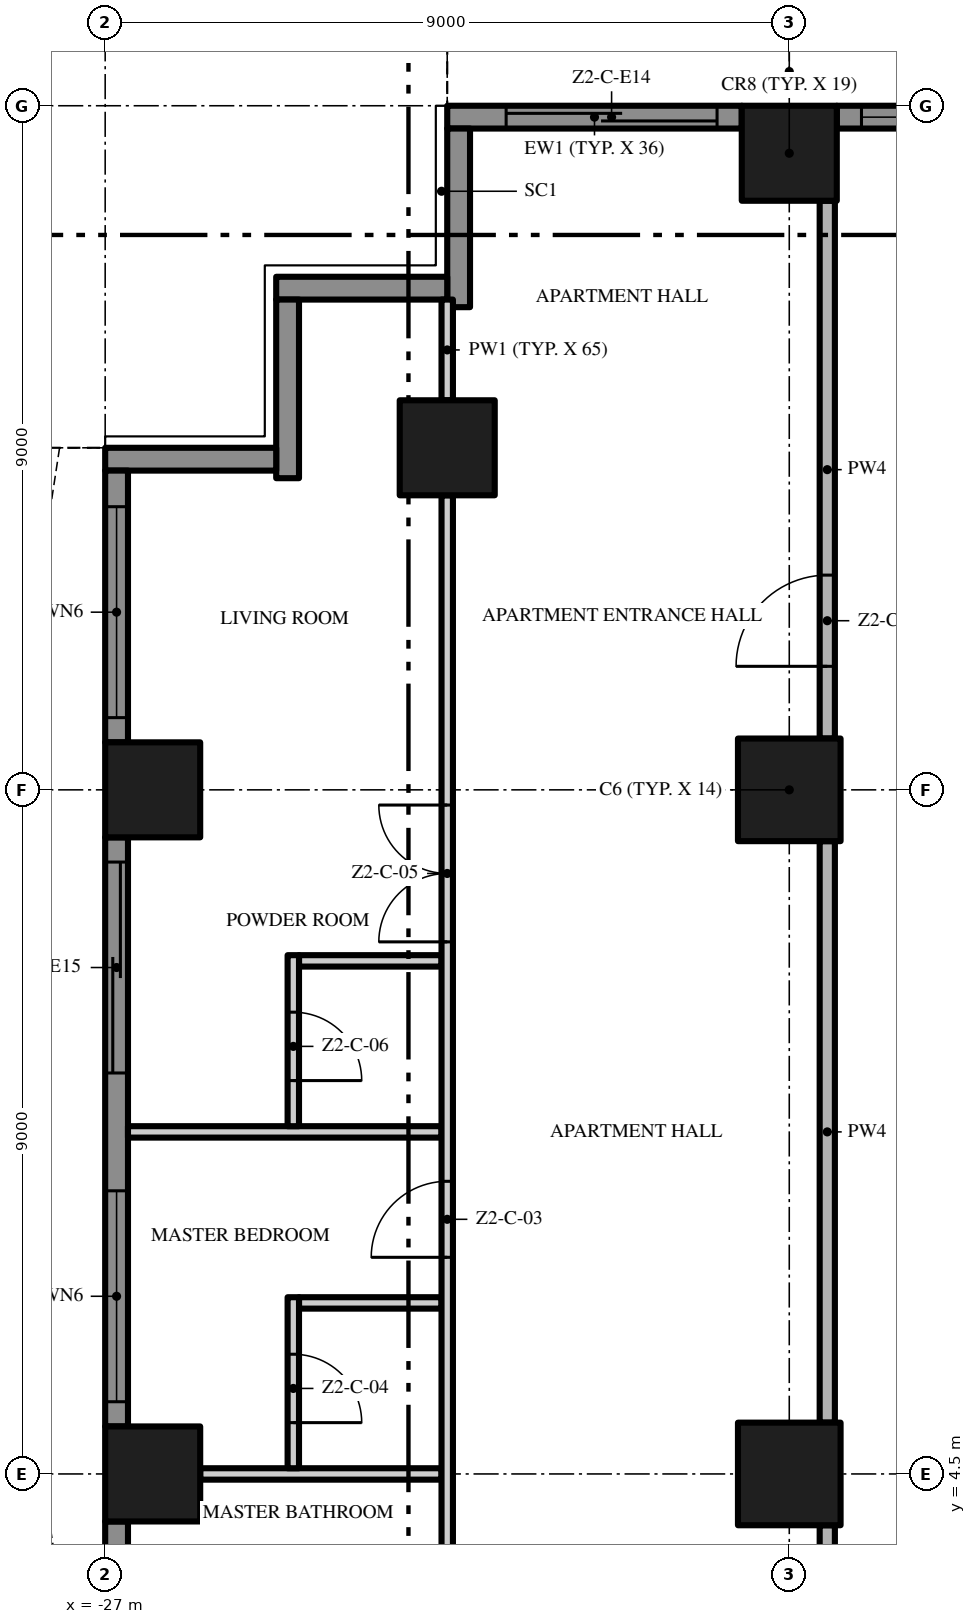
"""IFC4 building model, lengths in metres.
Left out: names, types, materials, properties, quantities, classifications, styles, units other than length and angle.
Written with IfcOpenShell. Run it as: python <this file> out.ifc"""

import sys

from ifc_helpers import new_model, si_unit, direction, frame, frame_2d, origin, origin_2d, place, context, subcontext, project, spatial, polyline, rectangle, outline, extrude, element, fill, save


model = new_model("IFC4")
c1 = context("Model", 3, precision=1e-05, world=origin(), true_north=direction((0.0, 1.0)))
c2 = subcontext(c1, "Body", "Model", "MODEL_VIEW")
j1 = project(units=[si_unit("LENGTHUNIT", "METRE"), si_unit("PLANEANGLEUNIT", "RADIAN")], contexts=[c1])
p1 = place(None, origin())
s1 = spatial("IfcSite", under=j1, at=p1, CompositionType="ELEMENT")
p2 = place(p1, origin())
s2 = spatial("IfcBuilding", under=s1, at=p2, CompositionType="ELEMENT")
p3 = place(p2, frame((0.0, 0.0, 99.8)))
s3 = spatial("IfcBuildingStorey", under=s2, at=p3, CompositionType="ELEMENT", Elevation=99.8)
p4 = place(p3, frame((-18.0, 13.5, 0.0), z_axis=(0.0, 0.0, 1.0), x_axis=(1.0, 0.0, 0.0)))
e1 = element("IfcColumn", 1, at=p4, inside=s3, PredefinedType="COLUMN", context=c2, shape_type="SweptSolid", body=[
    extrude(rectangle(XDim=1.35, YDim=1.35, at=origin_2d()), origin(), (0.0, 0.0, 1.0), 3.5),
])
p5 = place(p3, frame((-18.0, 21.875, 0.0), z_axis=(0.0, 0.0, 1.0), x_axis=(1.0, 0.0, 0.0)))
e2 = element("IfcColumn", 2, at=p5, inside=s3, PredefinedType="COLUMN", context=c2, shape_type="SweptSolid", body=[
    extrude(rectangle(XDim=1.25, YDim=1.25, at=origin_2d()), origin(), (0.0, 0.0, 1.0), 3.5),
])
p6 = place(p3, frame((-18.0, 4.5, 0.0), z_axis=(0.0, 0.0, 1.0), x_axis=(1.0, 0.0, 0.0)))
e3 = element("IfcColumn", 3, at=p6, inside=s3, PredefinedType="COLUMN", context=c2, shape_type="SweptSolid", body=[
    extrude(rectangle(XDim=1.35, YDim=1.35, at=origin_2d()), origin(), (0.0, 0.0, 1.0), 3.5),
])
for number, where, z_axis, x_axis in (
    (4, (-26.375, 13.5, 0.0), (0.0, 0.0, 1.0), (1.0, 0.0, 0.0)),
    (5, (-22.5, 18.0, 0.0), (0.0, 0.0, 1.0), (1.0, 0.0, 0.0)),
    (6, (-26.375, 4.5, 0.0), (0.0, 0.0, 1.0), (1.0, 0.0, 0.0)),
):
    element("IfcColumn", number, at=place(p3, frame(where, z_axis=z_axis, x_axis=x_axis)), inside=s3, PredefinedType="COLUMN", context=c2, shape_type="SweptSolid", body=[
        extrude(rectangle(XDim=1.25, YDim=1.25, at=origin_2d()), origin(), (0.0, 0.0, 1.0), 3.5),
    ])
p7 = place(p3, frame((-17.375, 22.35, 0.0), z_axis=(0.0, 0.0, 1.0), x_axis=(1.0, 0.0, 0.0)))
e7 = element("IfcWall", 7, at=p7, inside=s3, PredefinedType="SOLIDWALL", context=c2, shape_type="SweptSolid", body=[
    extrude(rectangle(XDim=3.875, YDim=0.3, at=frame_2d((1.938, 0.0))), origin(), (0.0, 0.0, 1.0), 3.5),
])
p8 = place(p7, frame((0.325, 0.0, 0.45)))
e8 = element("IfcOpeningElement", 8, at=p8, cuts=e7, PredefinedType="OPENING", context=c2, shape_type="SweptSolid", body=[
    extrude(rectangle(XDim=2.775, YDim=2.65, at=frame_2d((1.387, 1.325))), frame((0.0, 0.16, 0.0), z_axis=(0.0, -1.0, 0.0), x_axis=(1.0, 0.0, 0.0)), (0.0, 0.0, 1.0), 0.32),
])
p9 = place(p3, frame((-22.5, 22.35, 0.0), z_axis=(0.0, 0.0, 1.0), x_axis=(1.0, 0.0, 0.0)))
e9 = element("IfcWall", 9, at=p9, inside=s3, PredefinedType="SOLIDWALL", context=c2, shape_type="SweptSolid", body=[
    extrude(rectangle(XDim=3.875, YDim=0.3, at=frame_2d((1.938, 0.0))), origin(), (0.0, 0.0, 1.0), 3.5),
])
p10 = place(p9, frame((0.775, 0.0, 0.0)))
e10 = element("IfcOpeningElement", 10, at=p10, cuts=e9, PredefinedType="OPENING", context=c2, shape_type="SweptSolid", body=[
    extrude(rectangle(XDim=2.775, YDim=2.4, at=frame_2d((1.387, 1.2))), frame((0.0, 0.16, 0.0), z_axis=(0.0, -1.0, 0.0), x_axis=(1.0, 0.0, 0.0)), (0.0, 0.0, 1.0), 0.32),
])
p11 = place(p3, frame((-22.35, 19.85, 0.0), z_axis=(0.0, 0.0, 1.0), x_axis=(0.0, 1.0, 0.0)))
e11 = element("IfcWall", 11, at=p11, inside=s3, PredefinedType="SOLIDWALL", context=c2, shape_type="SweptSolid", body=[
    extrude(rectangle(XDim=2.35, YDim=0.3, at=frame_2d((1.175, 0.0))), origin(), (0.0, 0.0, 1.0), 3.5),
])
p12 = place(p3, frame((-24.75, 20.1, 0.0), z_axis=(0.0, 0.0, 1.0), x_axis=(1.0, 0.0, 0.0)))
e12 = element("IfcWall", 12, at=p12, inside=s3, PredefinedType="SOLIDWALL", context=c2, shape_type="SweptSolid", body=[
    extrude(rectangle(XDim=2.25, YDim=0.3, at=frame_2d((1.125, 0.0))), origin(), (0.0, 0.0, 1.0), 3.5),
])
p13 = place(p3, frame((-24.6, 17.6, 0.0), z_axis=(0.0, 0.0, 1.0), x_axis=(0.0, 1.0, 0.0)))
e13 = element("IfcWall", 13, at=p13, inside=s3, PredefinedType="SOLIDWALL", context=c2, shape_type="SweptSolid", body=[
    extrude(rectangle(XDim=2.35, YDim=0.3, at=frame_2d((1.175, 0.0))), origin(), (0.0, 0.0, 1.0), 3.5),
])
p14 = place(p3, frame((-27.0, 17.85, 0.0), z_axis=(0.0, 0.0, 1.0), x_axis=(1.0, 0.0, 0.0)))
e14 = element("IfcWall", 14, at=p14, inside=s3, PredefinedType="SOLIDWALL", context=c2, shape_type="SweptSolid", body=[
    extrude(rectangle(XDim=2.25, YDim=0.3, at=frame_2d((1.125, 0.0))), origin(), (0.0, 0.0, 1.0), 3.5),
])
p15 = place(p3, frame((-26.85, 14.125, 0.0), z_axis=(0.0, 0.0, 1.0), x_axis=(0.0, 1.0, 0.0)))
e15 = element("IfcWall", 15, at=p15, inside=s3, PredefinedType="SOLIDWALL", context=c2, shape_type="SweptSolid", body=[
    extrude(rectangle(XDim=3.575, YDim=0.3, at=frame_2d((1.788, 0.0))), origin(), (0.0, 0.0, 1.0), 3.5),
])
p16 = place(p15, frame((0.325, 0.0, 0.45)))
e16 = element("IfcOpeningElement", 16, at=p16, cuts=e15, PredefinedType="OPENING", context=c2, shape_type="SweptSolid", body=[
    extrude(rectangle(XDim=2.775, YDim=2.65, at=frame_2d((1.387, 1.325))), frame((0.0, 0.16, 0.0), z_axis=(0.0, -1.0, 0.0), x_axis=(1.0, 0.0, 0.0)), (0.0, 0.0, 1.0), 0.32),
])
p17 = place(p3, frame((-26.85, 5.125, 0.0), z_axis=(0.0, 0.0, 1.0), x_axis=(0.0, 1.0, 0.0)))
e17 = element("IfcWall", 17, at=p17, inside=s3, PredefinedType="SOLIDWALL", context=c2, shape_type="SweptSolid", body=[
    extrude(rectangle(XDim=7.75, YDim=0.3, at=frame_2d((3.875, 0.0))), origin(), (0.0, 0.0, 1.0), 3.5),
])
p18 = place(p17, frame((4.65, 0.0, 0.0)))
e18 = element("IfcOpeningElement", 18, at=p18, cuts=e17, PredefinedType="OPENING", context=c2, shape_type="SweptSolid", body=[
    extrude(rectangle(XDim=2.775, YDim=2.4, at=frame_2d((1.387, 1.2))), frame((0.0, 0.16, 0.0), z_axis=(0.0, -1.0, 0.0), x_axis=(1.0, 0.0, 0.0)), (0.0, 0.0, 1.0), 0.32),
])
p19 = place(p17, frame((0.325, 0.0, 0.45)))
e19 = element("IfcOpeningElement", 19, at=p19, cuts=e17, PredefinedType="OPENING", context=c2, shape_type="SweptSolid", body=[
    extrude(rectangle(XDim=2.775, YDim=2.65, at=frame_2d((1.387, 1.325))), frame((0.0, 0.16, 0.0), z_axis=(0.0, -1.0, 0.0), x_axis=(1.0, 0.0, 0.0)), (0.0, 0.0, 1.0), 0.32),
])
p20 = place(p3, frame((-26.85, -3.875, 0.0), z_axis=(0.0, 0.0, 1.0), x_axis=(0.0, 1.0, 0.0)))
e20 = element("IfcWall", 20, at=p20, inside=s3, PredefinedType="SOLIDWALL", context=c2, shape_type="SweptSolid", body=[
    extrude(rectangle(XDim=7.75, YDim=0.3, at=frame_2d((3.875, 0.0))), origin(), (0.0, 0.0, 1.0), 3.5),
])
p21 = place(p20, frame((4.65, 0.0, 0.45)))
e21 = element("IfcOpeningElement", 21, at=p21, cuts=e20, PredefinedType="OPENING", context=c2, shape_type="SweptSolid", body=[
    extrude(rectangle(XDim=2.775, YDim=2.65, at=frame_2d((1.387, 1.325))), frame((0.0, 0.16, 0.0), z_axis=(0.0, -1.0, 0.0), x_axis=(1.0, 0.0, 0.0)), (0.0, 0.0, 1.0), 0.32),
])
p22 = place(p20, frame((0.325, 0.0, 0.0)))
e22 = element("IfcOpeningElement", 22, at=p22, cuts=e20, PredefinedType="OPENING", context=c2, shape_type="SweptSolid", body=[
    extrude(rectangle(XDim=2.775, YDim=2.4, at=frame_2d((1.387, 1.2))), frame((0.0, 0.16, 0.0), z_axis=(0.0, -1.0, 0.0), x_axis=(1.0, 0.0, 0.0)), (0.0, 0.0, 1.0), 0.32),
])
p23 = place(p3, origin())
e23 = element("IfcWall", 23, at=p23, inside=s3, PredefinedType="USERDEFINED", context=c2, shape_type="SweptSolid", body=[
    extrude(outline(polyline([(-13.5, 23.1), (-15.0, 23.329), (-16.5, 23.929), (-18.0, 24.671), (-19.5, 25.271), (-21.0, 25.5), (-22.5, 25.271), (-22.462, 25.024), (-21.0, 25.247), (-19.566, 25.028), (-18.102, 24.442), (-16.602, 23.701), (-15.066, 23.086), (-13.538, 22.853), (-13.5, 23.1)])), origin(), (0.0, 0.0, 1.0), 0.9),
])
p24 = place(p3, origin())
e24 = element("IfcWall", 24, at=p24, inside=s3, PredefinedType="USERDEFINED", context=c2, shape_type="SweptSolid", body=[
    extrude(outline(polyline([(-27.6, 18.0), (-27.829, 16.5), (-28.429, 15.0), (-29.171, 13.5), (-29.771, 12.0), (-30.0, 10.5), (-29.771, 9.0), (-29.171, 7.5), (-28.429, 6.0), (-27.829, 4.5), (-27.6, 3.0), (-27.829, 1.5), (-28.429, 0.0), (-29.171, -1.5), (-29.771, -3.0), (-30.0, -4.5), (-29.771, -6.0), (-29.171, -7.5), (-28.429, -9.0), (-27.829, -10.5), (-27.6, -12.0), (-27.829, -13.5), (-28.429, -15.0), (-29.171, -16.5), (-29.771, -18.0), (-29.539, -18.093), (-28.942, -16.602), (-28.201, -15.102), (-27.586, -13.566), (-27.347, -12.0), (-27.586, -10.434), (-28.201, -8.898), (-28.942, -7.398), (-29.528, -5.934), (-29.747, -4.5), (-29.528, -3.066), (-28.942, -1.602), (-28.201, -0.102), (-27.586, 1.434), (-27.347, 3.0), (-27.586, 4.566), (-28.201, 6.102), (-28.942, 7.602), (-29.528, 9.066), (-29.747, 10.5), (-29.528, 11.934), (-28.942, 13.398), (-28.201, 14.898), (-27.586, 16.434), (-27.353, 17.962), (-27.6, 18.0)])), origin(), (0.0, 0.0, 1.0), 0.9),
])
p25 = place(p3, frame((-25.75, 4.5, 0.0), z_axis=(0.0, 0.0, 1.0), x_axis=(1.0, 0.0, 0.0)))
e25 = element("IfcWall", 25, at=p25, inside=s3, PredefinedType="PARTITIONING", context=c2, shape_type="SweptSolid", body=[
    extrude(rectangle(XDim=3.175, YDim=0.15, at=frame_2d((1.587, 0.0))), origin(), (0.0, 0.0, 1.0), 3.5),
])
p26 = place(p3, frame((-24.45, 6.75, 0.0), z_axis=(0.0, 0.0, 1.0), x_axis=(1.0, 0.0, 0.0)))
e26 = element("IfcWall", 26, at=p26, inside=s3, PredefinedType="PARTITIONING", context=c2, shape_type="SweptSolid", body=[
    extrude(rectangle(XDim=1.875, YDim=0.15, at=frame_2d((0.938, 0.0))), origin(), (0.0, 0.0, 1.0), 3.5),
])
p27 = place(p3, frame((-26.7, 9.0, 0.0), z_axis=(0.0, 0.0, 1.0), x_axis=(1.0, 0.0, 0.0)))
e27 = element("IfcWall", 27, at=p27, inside=s3, PredefinedType="PARTITIONING", context=c2, shape_type="SweptSolid", body=[
    extrude(rectangle(XDim=4.125, YDim=0.15, at=frame_2d((2.062, 0.0))), origin(), (0.0, 0.0, 1.0), 3.5),
])
p28 = place(p3, frame((-24.45, 11.25, 0.0), z_axis=(0.0, 0.0, 1.0), x_axis=(1.0, 0.0, 0.0)))
e28 = element("IfcWall", 28, at=p28, inside=s3, PredefinedType="PARTITIONING", context=c2, shape_type="SweptSolid", body=[
    extrude(rectangle(XDim=1.875, YDim=0.15, at=frame_2d((0.938, 0.0))), origin(), (0.0, 0.0, 1.0), 3.5),
])
p29 = place(p3, frame((-24.525, 6.825, 0.0), z_axis=(0.0, 0.0, 1.0), x_axis=(0.0, -1.0, 0.0)))
e29 = element("IfcWall", 29, at=p29, inside=s3, PredefinedType="PARTITIONING", context=c2, shape_type="SweptSolid", body=[
    extrude(rectangle(XDim=2.25, YDim=0.15, at=frame_2d((1.125, 0.0))), origin(), (0.0, 0.0, 1.0), 3.5),
])
p30 = place(p29, frame((0.75, 0.0, 0.0)))
e30 = element("IfcOpeningElement", 30, at=p30, cuts=e29, PredefinedType="OPENING", context=c2, shape_type="SweptSolid", body=[
    extrude(rectangle(XDim=0.9, YDim=2.1, at=frame_2d((0.45, 1.05))), frame((0.0, 0.085, 0.0), z_axis=(0.0, -1.0, 0.0), x_axis=(1.0, 0.0, 0.0)), (0.0, 0.0, 1.0), 0.17),
])
p31 = place(p3, frame((-24.525, 11.325, 0.0), z_axis=(0.0, 0.0, 1.0), x_axis=(0.0, -1.0, 0.0)))
e31 = element("IfcWall", 31, at=p31, inside=s3, PredefinedType="PARTITIONING", context=c2, shape_type="SweptSolid", body=[
    extrude(rectangle(XDim=2.25, YDim=0.15, at=frame_2d((1.125, 0.0))), origin(), (0.0, 0.0, 1.0), 3.5),
])
p32 = place(p31, frame((0.75, 0.0, 0.0)))
e32 = element("IfcOpeningElement", 32, at=p32, cuts=e31, PredefinedType="OPENING", context=c2, shape_type="SweptSolid", body=[
    extrude(rectangle(XDim=0.9, YDim=2.1, at=frame_2d((0.45, 1.05))), frame((0.0, 0.085, 0.0), z_axis=(0.0, -1.0, 0.0), x_axis=(1.0, 0.0, 0.0)), (0.0, 0.0, 1.0), 0.17),
])
p33 = place(p3, frame((-22.5, 0.1, 0.0), z_axis=(0.0, 0.0, 1.0), x_axis=(0.0, 1.0, 0.0)))
e33 = element("IfcWall", 33, at=p33, inside=s3, PredefinedType="PARTITIONING", context=c2, shape_type="SweptSolid", body=[
    extrude(rectangle(XDim=17.275, YDim=0.15, at=frame_2d((8.637, 0.0))), origin(), (0.0, 0.0, 1.0), 3.5),
])
p34 = place(p33, frame((1.65, 0.0, 0.0)))
e34 = element("IfcOpeningElement", 34, at=p34, cuts=e33, PredefinedType="OPENING", context=c2, shape_type="SweptSolid", body=[
    extrude(rectangle(XDim=1.0, YDim=2.4, at=frame_2d((0.5, 1.2))), frame((0.0, 0.085, 0.0), z_axis=(0.0, -1.0, 0.0), x_axis=(1.0, 0.0, 0.0)), (0.0, 0.0, 1.0), 0.17),
])
p35 = place(p33, frame((7.25, 0.0, 0.0)))
e35 = element("IfcOpeningElement", 35, at=p35, cuts=e33, PredefinedType="OPENING", context=c2, shape_type="SweptSolid", body=[
    extrude(rectangle(XDim=1.0, YDim=2.4, at=frame_2d((0.5, 1.2))), frame((0.0, 0.085, 0.0), z_axis=(0.0, -1.0, 0.0), x_axis=(1.0, 0.0, 0.0)), (0.0, 0.0, 1.0), 0.17),
])
p36 = place(p33, frame((11.4, 0.0, 0.0)))
e36 = element("IfcOpeningElement", 36, at=p36, cuts=e33, PredefinedType="OPENING", context=c2, shape_type="SweptSolid", body=[
    extrude(rectangle(XDim=1.8, YDim=2.4, at=frame_2d((0.9, 1.2))), frame((0.0, 0.085, 0.0), z_axis=(0.0, -1.0, 0.0), x_axis=(1.0, 0.0, 0.0)), (0.0, 0.0, 1.0), 0.17),
])
p37 = place(p3, frame((-22.5, 18.625, 0.0), z_axis=(0.0, 0.0, 1.0), x_axis=(0.0, 1.0, 0.0)))
e37 = element("IfcWall", 37, at=p37, inside=s3, PredefinedType="PARTITIONING", context=c2, shape_type="SweptSolid", body=[
    extrude(rectangle(XDim=1.325, YDim=0.15, at=frame_2d((0.662, 0.0))), origin(), (0.0, 0.0, 1.0), 3.5),
])
p38 = place(p3, frame((-17.5, -0.2, 0.0), z_axis=(0.0, 0.0, 1.0), x_axis=(0.0, 1.0, 0.0)))
e38 = element("IfcWall", 38, at=p38, inside=s3, PredefinedType="PARTITIONING", context=c2, shape_type="SweptSolid", body=[
    extrude(rectangle(XDim=4.025, YDim=0.2, at=frame_2d((2.013, 0.0))), origin(), (0.0, 0.0, 1.0), 3.5),
])
p39 = place(p3, frame((-17.5, 5.175, 0.0), z_axis=(0.0, 0.0, 1.0), x_axis=(0.0, 1.0, 0.0)))
e39 = element("IfcWall", 39, at=p39, inside=s3, PredefinedType="PARTITIONING", context=c2, shape_type="SweptSolid", body=[
    extrude(rectangle(XDim=7.65, YDim=0.2, at=frame_2d((3.825, 0.0))), origin(), (0.0, 0.0, 1.0), 3.5),
])
p40 = place(p3, frame((-17.5, 14.175, 0.0), z_axis=(0.0, 0.0, 1.0), x_axis=(0.0, 1.0, 0.0)))
e40 = element("IfcWall", 40, at=p40, inside=s3, PredefinedType="PARTITIONING", context=c2, shape_type="SweptSolid", body=[
    extrude(rectangle(XDim=7.075, YDim=0.2, at=frame_2d((3.538, 0.0))), origin(), (0.0, 0.0, 1.0), 3.5),
])
p41 = place(p40, frame((0.95, 0.0, 0.0)))
e41 = element("IfcOpeningElement", 41, at=p41, cuts=e40, PredefinedType="OPENING", context=c2, shape_type="SweptSolid", body=[
    extrude(rectangle(XDim=1.2, YDim=2.4, at=frame_2d((0.6, 1.2))), frame((0.0, 0.11, 0.0), z_axis=(0.0, -1.0, 0.0), x_axis=(1.0, 0.0, 0.0)), (0.0, 0.0, 1.0), 0.22),
])
p42 = place(p8, origin())
e42 = element("IfcWindow", 42, at=p42, inside=s3, PartitioningType="SINGLE_PANEL", PredefinedType="WINDOW", context=c2, shape_type="SweptSolid", body=[
    extrude(rectangle(XDim=2.775, YDim=2.65, at=frame_2d((1.387, 1.325))), frame((0.0, 0.03, 0.0), z_axis=(0.0, -1.0, 0.0), x_axis=(1.0, 0.0, 0.0)), (0.0, 0.0, 1.0), 0.06),
])
fill(e8, e42)
p43 = place(p10, origin())
e43 = element("IfcDoor", 43, at=p43, inside=s3, OperationType="SINGLE_SWING_LEFT", PredefinedType="DOOR", context=c2, shape_type="SweptSolid", body=[
    extrude(rectangle(XDim=2.775, YDim=2.4, at=frame_2d((1.387, 1.2))), frame((0.0, 0.025, 0.0), z_axis=(0.0, -1.0, 0.0), x_axis=(1.0, 0.0, 0.0)), (0.0, 0.0, 1.0), 0.05),
])
fill(e10, e43)
p44 = place(p16, origin())
e44 = element("IfcWindow", 44, at=p44, inside=s3, PartitioningType="SINGLE_PANEL", PredefinedType="WINDOW", context=c2, shape_type="SweptSolid", body=[
    extrude(rectangle(XDim=2.775, YDim=2.65, at=frame_2d((1.387, 1.325))), frame((0.0, 0.03, 0.0), z_axis=(0.0, -1.0, 0.0), x_axis=(1.0, 0.0, 0.0)), (0.0, 0.0, 1.0), 0.06),
])
fill(e16, e44)
p45 = place(p18, origin())
e45 = element("IfcDoor", 45, at=p45, inside=s3, OperationType="SINGLE_SWING_LEFT", PredefinedType="DOOR", context=c2, shape_type="SweptSolid", body=[
    extrude(rectangle(XDim=2.775, YDim=2.4, at=frame_2d((1.387, 1.2))), frame((0.0, 0.025, 0.0), z_axis=(0.0, -1.0, 0.0), x_axis=(1.0, 0.0, 0.0)), (0.0, 0.0, 1.0), 0.05),
])
fill(e18, e45)
p46 = place(p19, origin())
e46 = element("IfcWindow", 46, at=p46, inside=s3, PartitioningType="SINGLE_PANEL", PredefinedType="WINDOW", context=c2, shape_type="SweptSolid", body=[
    extrude(rectangle(XDim=2.775, YDim=2.65, at=frame_2d((1.387, 1.325))), frame((0.0, 0.03, 0.0), z_axis=(0.0, -1.0, 0.0), x_axis=(1.0, 0.0, 0.0)), (0.0, 0.0, 1.0), 0.06),
])
fill(e19, e46)
p47 = place(p41, origin())
e47 = element("IfcDoor", 47, at=p47, inside=s3, OperationType="SINGLE_SWING_LEFT", PredefinedType="DOOR", context=c2, shape_type="SweptSolid", body=[
    extrude(rectangle(XDim=1.2, YDim=2.4, at=frame_2d((0.6, 1.2))), frame((0.0, 0.025, 0.0), z_axis=(0.0, -1.0, 0.0), x_axis=(1.0, 0.0, 0.0)), (0.0, 0.0, 1.0), 0.05),
])
fill(e41, e47)
p48 = place(p35, origin())
e48 = element("IfcDoor", 48, at=p48, inside=s3, OperationType="SINGLE_SWING_LEFT", PredefinedType="DOOR", context=c2, shape_type="SweptSolid", body=[
    extrude(rectangle(XDim=1.0, YDim=2.4, at=frame_2d((0.5, 1.2))), frame((0.0, 0.025, 0.0), z_axis=(0.0, -1.0, 0.0), x_axis=(1.0, 0.0, 0.0)), (0.0, 0.0, 1.0), 0.05),
])
fill(e35, e48)
p49 = place(p30, origin())
e49 = element("IfcDoor", 49, at=p49, inside=s3, OperationType="SINGLE_SWING_RIGHT", PredefinedType="DOOR", context=c2, shape_type="SweptSolid", body=[
    extrude(rectangle(XDim=0.9, YDim=2.1, at=frame_2d((0.45, 1.05))), frame((0.0, 0.025, 0.0), z_axis=(0.0, -1.0, 0.0), x_axis=(1.0, 0.0, 0.0)), (0.0, 0.0, 1.0), 0.05),
])
fill(e30, e49)
p50 = place(p36, origin())
e50 = element("IfcDoor", 50, at=p50, inside=s3, OperationType="DOUBLE_DOOR_SINGLE_SWING", PredefinedType="DOOR", context=c2, shape_type="SweptSolid", body=[
    extrude(rectangle(XDim=1.8, YDim=2.4, at=frame_2d((0.9, 1.2))), frame((0.0, 0.025, 0.0), z_axis=(0.0, -1.0, 0.0), x_axis=(1.0, 0.0, 0.0)), (0.0, 0.0, 1.0), 0.05),
])
fill(e36, e50)
p51 = place(p32, origin())
e51 = element("IfcDoor", 51, at=p51, inside=s3, OperationType="SINGLE_SWING_RIGHT", PredefinedType="DOOR", context=c2, shape_type="SweptSolid", body=[
    extrude(rectangle(XDim=0.9, YDim=2.1, at=frame_2d((0.45, 1.05))), frame((0.0, 0.025, 0.0), z_axis=(0.0, -1.0, 0.0), x_axis=(1.0, 0.0, 0.0)), (0.0, 0.0, 1.0), 0.05),
])
fill(e32, e51)
save(model, sys.argv[1])
